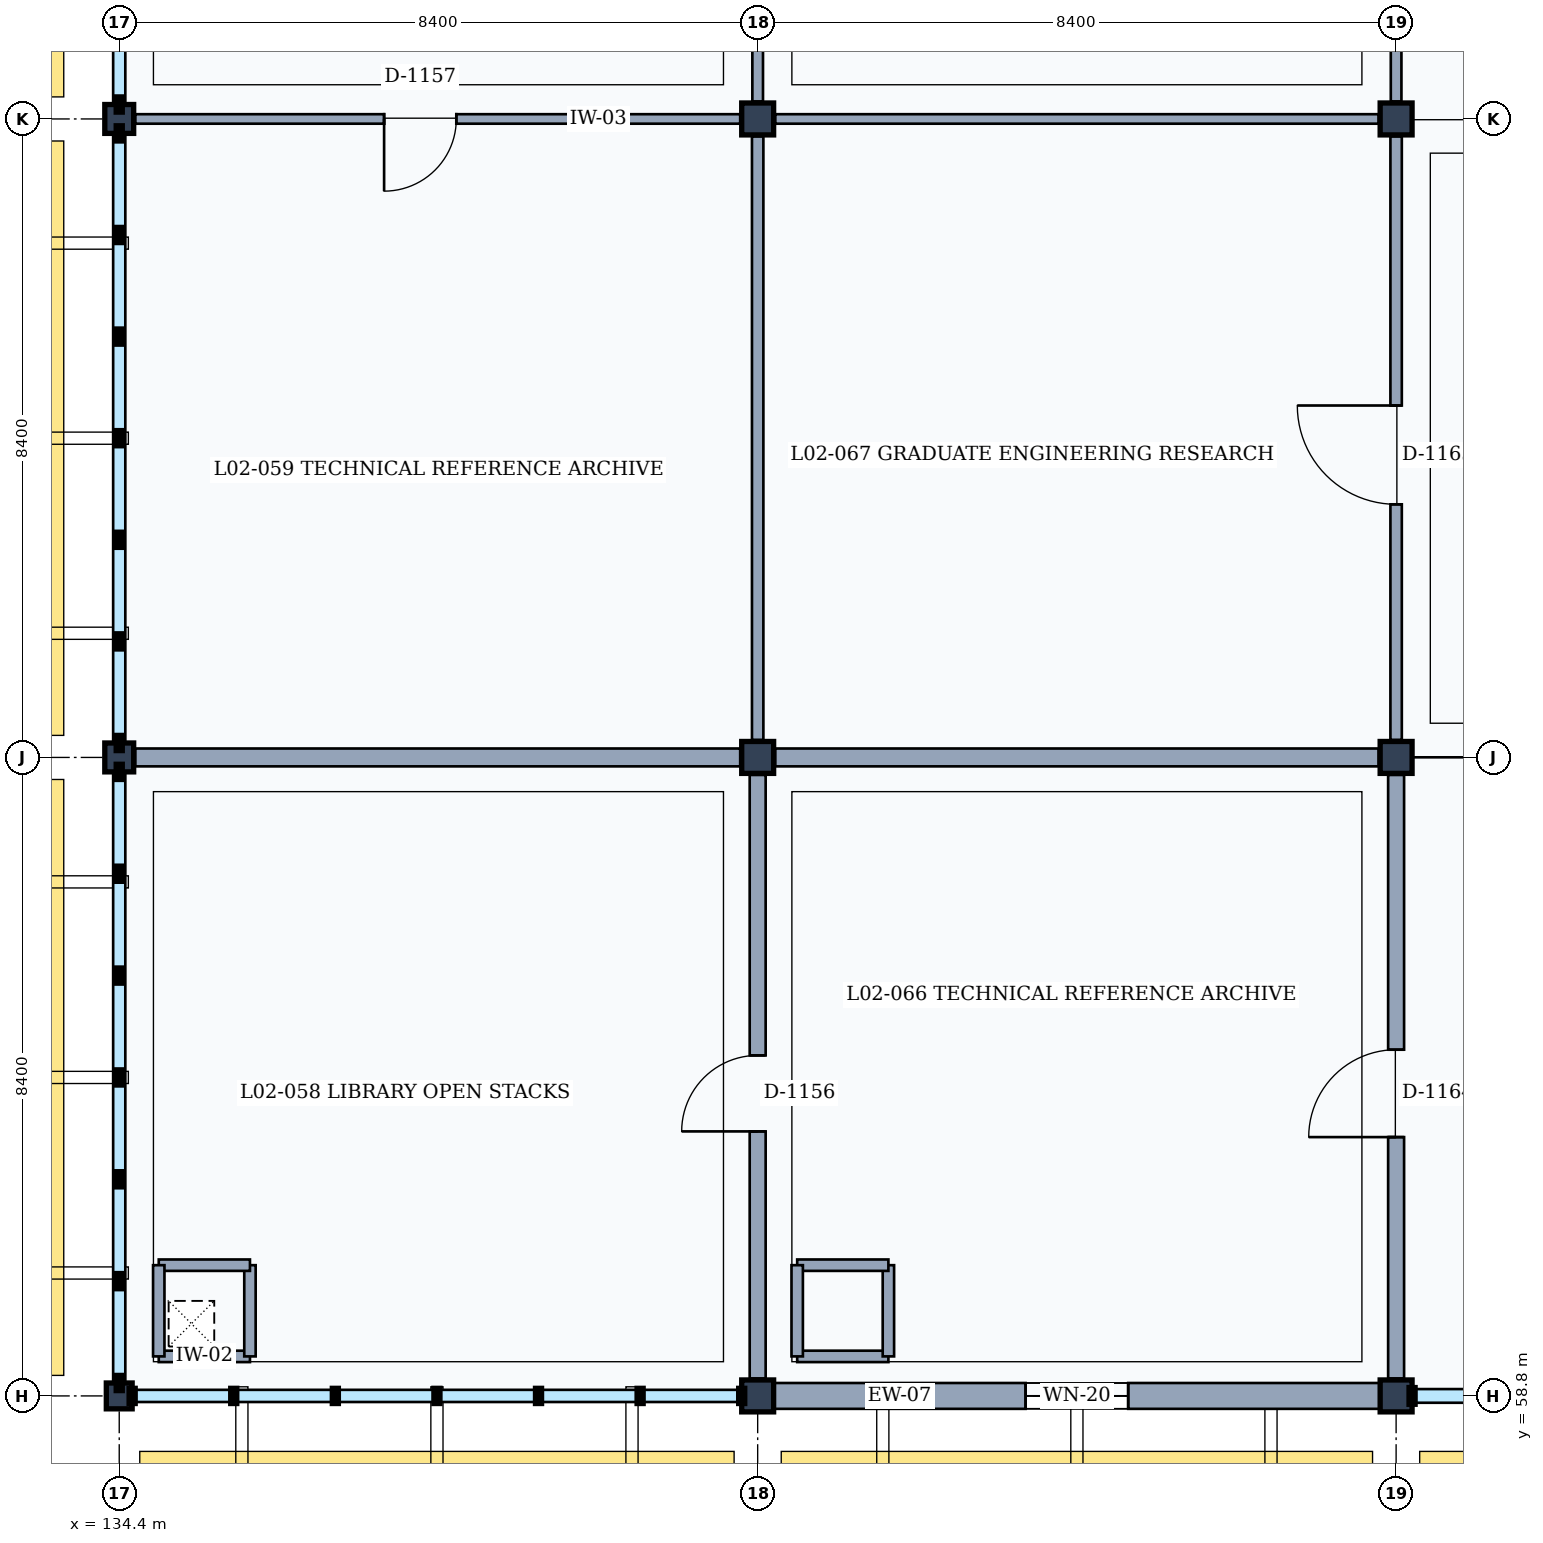
"""IFC4 building model, lengths in metres.
Left out: names, types, materials, properties, quantities, classifications, styles, units other than length and angle.
Written with IfcOpenShell. Run it as: python <this file> out.ifc"""

import sys

from ifc_helpers import new_model, si_unit, direction, frame, frame_2d, origin, origin_2d, place, context, subcontext, project, spatial, rectangle, extrude, element, fill, save


model = new_model("IFC4")
c1 = context("Model", 3, precision=1e-05, world=origin(), true_north=direction((0.0, 1.0)))
c2 = subcontext(c1, "Body", "Model", "MODEL_VIEW")
j1 = project(units=[si_unit("LENGTHUNIT", "METRE"), si_unit("PLANEANGLEUNIT", "RADIAN")], contexts=[c1])
p1 = place(None, origin())
s1 = spatial("IfcSite", under=j1, at=p1, CompositionType="ELEMENT")
p2 = place(p1, origin())
s2 = spatial("IfcBuilding", under=s1, at=p2, CompositionType="ELEMENT")
p3 = place(p2, frame((0.0, 0.0, 9.6)))
s3 = spatial("IfcBuildingStorey", under=s2, at=p3, CompositionType="ELEMENT", Elevation=9.6)
p4 = place(p3, frame((134.4, 58.8, 0.0), z_axis=(0.0, 0.0, 1.0), x_axis=(1.0, 0.0, 0.0)))
e1 = element("IfcColumn", 1, at=p4, inside=s3, PredefinedType="COLUMN", context=c2, shape_type="SweptSolid", body=[
    extrude(rectangle(XDim=0.34, YDim=0.34, at=origin_2d()), origin(), (0.0, 0.0, 1.0), 4.2),
])
for number, where, z_axis, x_axis in (
    (2, (134.4, 67.2, 0.0), (0.0, 0.0, 1.0), (1.0, 0.0, 0.0)),
    (3, (134.4, 75.6, 0.0), (0.0, 0.0, 1.0), (1.0, 0.0, 0.0)),
):
    element("IfcColumn", number, at=place(p3, frame(where, z_axis=z_axis, x_axis=x_axis)), inside=s3, PredefinedType="COLUMN", context=c2, shape_type="SweptSolid", body=[
        extrude(rectangle(XDim=0.38, YDim=0.38, at=origin_2d()), origin(), (0.0, 0.0, 1.0), 4.2),
    ])
for number, where, z_axis, x_axis in (
    (4, (142.8, 58.8, 0.0), (0.0, 0.0, 1.0), (1.0, 0.0, 0.0)),
    (5, (142.8, 67.2, 0.0), (0.0, 0.0, 1.0), (1.0, 0.0, 0.0)),
    (6, (142.8, 75.6, 0.0), (0.0, 0.0, 1.0), (1.0, 0.0, 0.0)),
    (7, (151.2, 58.8, 0.0), (0.0, 0.0, 1.0), (1.0, 0.0, 0.0)),
    (8, (151.2, 67.2, 0.0), (0.0, 0.0, 1.0), (1.0, 0.0, 0.0)),
    (9, (151.2, 75.6, 0.0), (0.0, 0.0, 1.0), (1.0, 0.0, 0.0)),
):
    element("IfcColumn", number, at=place(p3, frame(where, z_axis=z_axis, x_axis=x_axis)), inside=s3, PredefinedType="COLUMN", context=c2, shape_type="SweptSolid", body=[
        extrude(rectangle(XDim=0.42, YDim=0.42, at=origin_2d()), origin(), (0.0, 0.0, 1.0), 4.2),
    ])
p5 = place(p3, frame((150.99, 58.8, 0.0), z_axis=(0.0, 0.0, 1.0), x_axis=(-1.0, 0.0, 0.0)))
e10 = element("IfcWall", 10, at=p5, inside=s3, PredefinedType="SOLIDWALL", context=c2, shape_type="SweptSolid", body=[
    extrude(rectangle(XDim=7.98, YDim=0.34, at=frame_2d((3.99, 0.0))), origin(), (0.0, 0.0, 1.0), 3.36),
])
p6 = place(p5, frame((3.315, 0.0, 0.9)))
e11 = element("IfcOpeningElement", 11, at=p6, cuts=e10, PredefinedType="OPENING", context=c2, shape_type="SweptSolid", body=[
    extrude(rectangle(XDim=1.35, YDim=1.6, at=frame_2d((0.675, 0.8))), frame((0.0, 0.18, 0.0), z_axis=(0.0, -1.0, 0.0), x_axis=(1.0, 0.0, 0.0)), (0.0, 0.0, 1.0), 0.36),
])
p7 = place(p3, frame((134.92, 59.32, 0.0), z_axis=(0.0, 0.0, 1.0), x_axis=(1.0, 0.0, 0.0)))
e12 = element("IfcWall", 12, at=p7, inside=s3, PredefinedType="PARTITIONING", context=c2, shape_type="SweptSolid", body=[
    extrude(rectangle(XDim=1.2, YDim=0.15, at=frame_2d((0.6, 0.0))), origin(), (0.0, 0.0, 1.0), 3.93),
])
p8 = place(p3, frame((136.12, 59.32, 0.0), z_axis=(0.0, 0.0, 1.0), x_axis=(0.0, 1.0, 0.0)))
e13 = element("IfcWall", 13, at=p8, inside=s3, PredefinedType="PARTITIONING", context=c2, shape_type="SweptSolid", body=[
    extrude(rectangle(XDim=1.2, YDim=0.15, at=frame_2d((0.6, 0.0))), origin(), (0.0, 0.0, 1.0), 3.93),
])
p9 = place(p3, frame((136.12, 60.52, 0.0), z_axis=(0.0, 0.0, 1.0), x_axis=(-1.0, 0.0, 0.0)))
e14 = element("IfcWall", 14, at=p9, inside=s3, PredefinedType="PARTITIONING", context=c2, shape_type="SweptSolid", body=[
    extrude(rectangle(XDim=1.2, YDim=0.15, at=frame_2d((0.6, 0.0))), origin(), (0.0, 0.0, 1.0), 3.93),
])
p10 = place(p3, frame((134.92, 60.52, 0.0), z_axis=(0.0, 0.0, 1.0), x_axis=(0.0, -1.0, 0.0)))
e15 = element("IfcWall", 15, at=p10, inside=s3, PredefinedType="PARTITIONING", context=c2, shape_type="SweptSolid", body=[
    extrude(rectangle(XDim=1.2, YDim=0.15, at=frame_2d((0.6, 0.0))), origin(), (0.0, 0.0, 1.0), 3.93),
])
for number, where, z_axis, x_axis in (
    (16, (143.32, 59.32, 0.0), (0.0, 0.0, 1.0), (1.0, 0.0, 0.0)),
    (17, (144.52, 59.32, 0.0), (0.0, 0.0, 1.0), (0.0, 1.0, 0.0)),
    (18, (144.52, 60.52, 0.0), (0.0, 0.0, 1.0), (-1.0, 0.0, 0.0)),
    (19, (143.32, 60.52, 0.0), (0.0, 0.0, 1.0), (0.0, -1.0, 0.0)),
):
    element("IfcWall", number, at=place(p3, frame(where, z_axis=z_axis, x_axis=x_axis)), inside=s3, PredefinedType="PARTITIONING", context=c2, shape_type="SweptSolid", body=[
        extrude(rectangle(XDim=1.2, YDim=0.15, at=frame_2d((0.6, 0.0))), origin(), (0.0, 0.0, 1.0), 3.96),
    ])
p11 = place(p3, frame((142.8, 59.03, 0.0), z_axis=(0.0, 0.0, 1.0), x_axis=(0.0, 1.0, 0.0)))
e20 = element("IfcWall", 20, at=p11, inside=s3, PredefinedType="PARTITIONING", context=c2, shape_type="SweptSolid", body=[
    extrude(rectangle(XDim=7.94, YDim=0.21, at=frame_2d((3.97, 0.0))), origin(), (0.0, 0.0, 1.0), 3.32),
])
p12 = place(p11, frame((3.25, 0.0, 0.0)))
e21 = element("IfcOpeningElement", 21, at=p12, cuts=e20, PredefinedType="OPENING", context=c2, shape_type="SweptSolid", body=[
    extrude(rectangle(XDim=1.0, YDim=2.15, at=frame_2d((0.5, 1.075))), frame((0.0, 0.115, 0.0), z_axis=(0.0, -1.0, 0.0), x_axis=(1.0, 0.0, 0.0)), (0.0, 0.0, 1.0), 0.23),
])
p13 = place(p3, frame((134.61, 67.2, 0.0), z_axis=(0.0, 0.0, 1.0), x_axis=(1.0, 0.0, 0.0)))
e22 = element("IfcWall", 22, at=p13, inside=s3, PredefinedType="PARTITIONING", context=c2, shape_type="SweptSolid", body=[
    extrude(rectangle(XDim=7.96, YDim=0.235, at=frame_2d((3.98, 0.0))), origin(), (0.0, 0.0, 1.0), 3.32),
])
p14 = place(p3, frame((142.8, 67.43, 0.0), z_axis=(0.0, 0.0, 1.0), x_axis=(0.0, 1.0, 0.0)))
e23 = element("IfcWall", 23, at=p14, inside=s3, PredefinedType="PARTITIONING", context=c2, shape_type="SweptSolid", body=[
    extrude(rectangle(XDim=7.94, YDim=0.15, at=frame_2d((3.97, 0.0))), origin(), (0.0, 0.0, 1.0), 3.32),
])
p15 = place(p3, frame((134.61, 75.6, 0.0), z_axis=(0.0, 0.0, 1.0), x_axis=(1.0, 0.0, 0.0)))
e24 = element("IfcWall", 24, at=p15, inside=s3, PredefinedType="PARTITIONING", context=c2, shape_type="SweptSolid", body=[
    extrude(rectangle(XDim=7.96, YDim=0.125, at=frame_2d((3.98, 0.0))), origin(), (0.0, 0.0, 1.0), 3.32),
])
p16 = place(p15, frame((3.275, 0.0, 0.0)))
e25 = element("IfcOpeningElement", 25, at=p16, cuts=e24, PredefinedType="OPENING", context=c2, shape_type="SweptSolid", body=[
    extrude(rectangle(XDim=0.95, YDim=2.15, at=frame_2d((0.475, 1.075))), frame((0.0, 0.073, 0.0), z_axis=(0.0, -1.0, 0.0), x_axis=(1.0, 0.0, 0.0)), (0.0, 0.0, 1.0), 0.145),
])
p17 = place(p3, frame((142.8, 75.83, 0.0), z_axis=(0.0, 0.0, 1.0), x_axis=(0.0, 1.0, 0.0)))
e26 = element("IfcWall", 26, at=p17, inside=s3, PredefinedType="PARTITIONING", context=c2, shape_type="SweptSolid", body=[
    extrude(rectangle(XDim=7.94, YDim=0.14, at=frame_2d((3.97, 0.0))), origin(), (0.0, 0.0, 1.0), 3.32),
])
p18 = place(p3, frame((151.2, 59.03, 0.0), z_axis=(0.0, 0.0, 1.0), x_axis=(0.0, 1.0, 0.0)))
e27 = element("IfcWall", 27, at=p18, inside=s3, PredefinedType="PARTITIONING", context=c2, shape_type="SweptSolid", body=[
    extrude(rectangle(XDim=7.94, YDim=0.21, at=frame_2d((3.97, 0.0))), origin(), (0.0, 0.0, 1.0), 3.32),
])
p19 = place(p18, frame((3.175, 0.0, 0.0)))
e28 = element("IfcOpeningElement", 28, at=p19, cuts=e27, PredefinedType="OPENING", context=c2, shape_type="SweptSolid", body=[
    extrude(rectangle(XDim=1.15, YDim=2.25, at=frame_2d((0.575, 1.125))), frame((0.0, 0.115, 0.0), z_axis=(0.0, -1.0, 0.0), x_axis=(1.0, 0.0, 0.0)), (0.0, 0.0, 1.0), 0.23),
])
p20 = place(p3, frame((143.03, 67.2, 0.0), z_axis=(0.0, 0.0, 1.0), x_axis=(1.0, 0.0, 0.0)))
e29 = element("IfcWall", 29, at=p20, inside=s3, PredefinedType="PARTITIONING", context=c2, shape_type="SweptSolid", body=[
    extrude(rectangle(XDim=7.94, YDim=0.235, at=frame_2d((3.97, 0.0))), origin(), (0.0, 0.0, 1.0), 3.21),
])
p21 = place(p3, frame((151.2, 67.43, 0.0), z_axis=(0.0, 0.0, 1.0), x_axis=(0.0, 1.0, 0.0)))
e30 = element("IfcWall", 30, at=p21, inside=s3, PredefinedType="PARTITIONING", context=c2, shape_type="SweptSolid", body=[
    extrude(rectangle(XDim=7.94, YDim=0.15, at=frame_2d((3.97, 0.0))), origin(), (0.0, 0.0, 1.0), 3.32),
])
p22 = place(p21, frame((3.1, 0.0, 0.0)))
e31 = element("IfcOpeningElement", 31, at=p22, cuts=e30, PredefinedType="OPENING", context=c2, shape_type="SweptSolid", body=[
    extrude(rectangle(XDim=1.3, YDim=2.2, at=frame_2d((0.65, 1.1))), frame((0.0, 0.085, 0.0), z_axis=(0.0, -1.0, 0.0), x_axis=(1.0, 0.0, 0.0)), (0.0, 0.0, 1.0), 0.17),
])
p23 = place(p3, frame((143.03, 75.6, 0.0), z_axis=(0.0, 0.0, 1.0), x_axis=(1.0, 0.0, 0.0)))
e32 = element("IfcWall", 32, at=p23, inside=s3, PredefinedType="PARTITIONING", context=c2, shape_type="SweptSolid", body=[
    extrude(rectangle(XDim=7.94, YDim=0.125, at=frame_2d((3.97, 0.0))), origin(), (0.0, 0.0, 1.0), 3.22),
])
p24 = place(p3, frame((151.2, 75.83, 0.0), z_axis=(0.0, 0.0, 1.0), x_axis=(0.0, 1.0, 0.0)))
e33 = element("IfcWall", 33, at=p24, inside=s3, PredefinedType="PARTITIONING", context=c2, shape_type="SweptSolid", body=[
    extrude(rectangle(XDim=7.94, YDim=0.14, at=frame_2d((3.97, 0.0))), origin(), (0.0, 0.0, 1.0), 3.32),
])
p25 = place(p6, origin())
e34 = element("IfcWindow", 34, at=p25, inside=s3, PartitioningType="SINGLE_PANEL", PredefinedType="WINDOW", context=c2, shape_type="SweptSolid", body=[
    extrude(rectangle(XDim=1.35, YDim=1.6, at=frame_2d((0.675, 0.8))), frame((0.0, 0.03, 0.0), z_axis=(0.0, -1.0, 0.0), x_axis=(1.0, 0.0, 0.0)), (0.0, 0.0, 1.0), 0.06),
])
fill(e11, e34)
p26 = place(p12, origin())
e35 = element("IfcDoor", 35, at=p26, inside=s3, OperationType="SINGLE_SWING_LEFT", PredefinedType="DOOR", context=c2, shape_type="SweptSolid", body=[
    extrude(rectangle(XDim=1.0, YDim=2.15, at=frame_2d((0.5, 1.075))), frame((0.0, 0.025, 0.0), z_axis=(0.0, -1.0, 0.0), x_axis=(1.0, 0.0, 0.0)), (0.0, 0.0, 1.0), 0.05),
])
fill(e21, e35)
p27 = place(p16, frame((0.95, 0.0, 0.0), z_axis=(0.0, 0.0, 1.0), x_axis=(-1.0, 0.0, 0.0)))
e36 = element("IfcDoor", 36, at=p27, inside=s3, OperationType="SINGLE_SWING_RIGHT", PredefinedType="DOOR", context=c2, shape_type="SweptSolid", body=[
    extrude(rectangle(XDim=0.95, YDim=2.15, at=frame_2d((0.475, 1.075))), frame((0.0, 0.025, 0.0), z_axis=(0.0, -1.0, 0.0), x_axis=(1.0, 0.0, 0.0)), (0.0, 0.0, 1.0), 0.05),
])
fill(e25, e36)
p28 = place(p19, origin())
e37 = element("IfcDoor", 37, at=p28, inside=s3, OperationType="SINGLE_SWING_LEFT", PredefinedType="DOOR", context=c2, shape_type="SweptSolid", body=[
    extrude(rectangle(XDim=1.15, YDim=2.25, at=frame_2d((0.575, 1.125))), frame((0.0, 0.025, 0.0), z_axis=(0.0, -1.0, 0.0), x_axis=(1.0, 0.0, 0.0)), (0.0, 0.0, 1.0), 0.05),
])
fill(e28, e37)
p29 = place(p22, origin())
e38 = element("IfcDoor", 38, at=p29, inside=s3, OperationType="SINGLE_SWING_RIGHT", PredefinedType="DOOR", context=c2, shape_type="SweptSolid", body=[
    extrude(rectangle(XDim=1.3, YDim=2.2, at=frame_2d((0.65, 1.1))), frame((0.0, 0.025, 0.0), z_axis=(0.0, -1.0, 0.0), x_axis=(1.0, 0.0, 0.0)), (0.0, 0.0, 1.0), 0.05),
])
fill(e31, e38)
save(model, sys.argv[1])
